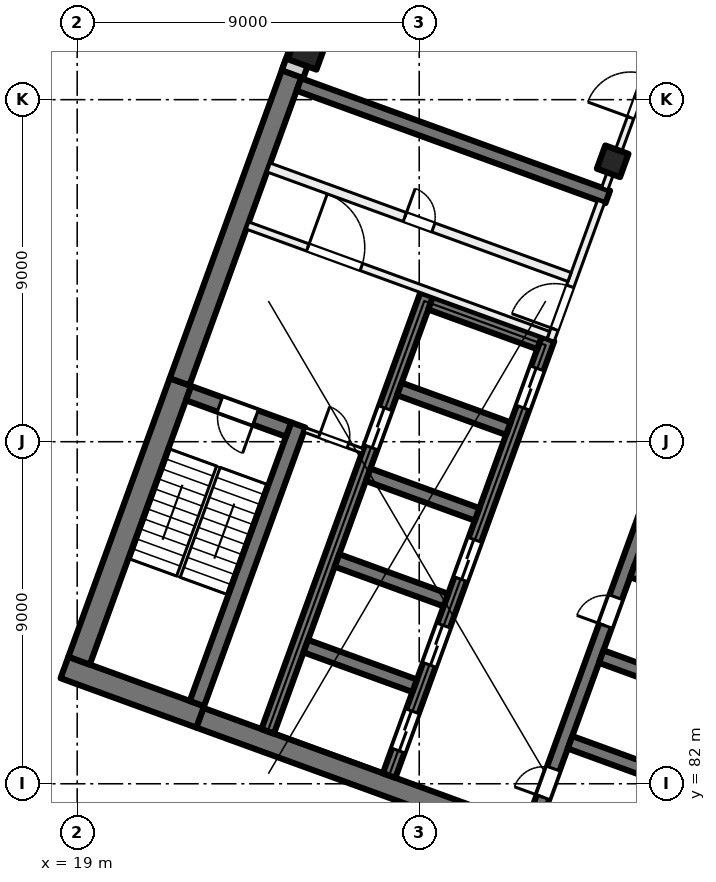
"""IFC4 building model, lengths in metres.
Left out: names, types, materials, properties, quantities, classifications, styles, units other than length and angle.
Written with IfcOpenShell. Run it as: python <this file> out.ifc"""

import sys

from ifc_helpers import new_model, si_unit, direction, frame, frame_2d, origin, origin_2d, place, context, subcontext, project, spatial, rectangle, extrude, element, fill, save


model = new_model("IFC4")
c1 = context("Model", 3, precision=1e-05, world=origin(), true_north=direction((0.0, 1.0)))
c2 = subcontext(c1, "Body", "Model", "MODEL_VIEW")
j1 = project(units=[si_unit("LENGTHUNIT", "METRE"), si_unit("PLANEANGLEUNIT", "RADIAN")], contexts=[c1])
p1 = place(None, origin())
s1 = spatial("IfcSite", under=j1, at=p1, CompositionType="ELEMENT")
p2 = place(p1, origin())
s2 = spatial("IfcBuilding", under=s1, at=p2, CompositionType="ELEMENT")
p3 = place(p2, frame((0.0, 0.0, 146.5)))
s3 = spatial("IfcBuildingStorey", under=s2, at=p3, CompositionType="ELEMENT", Elevation=146.5)
p4 = place(p3, frame((33.091, 98.379, 0.0), z_axis=(0.0, 0.0, 1.0), x_axis=(-0.342020143326, -0.939692620786, 0.0)))
e1 = element("IfcColumn", 1, at=p4, inside=s3, PredefinedType="COLUMN", context=c2, shape_type="SweptSolid", body=[
    extrude(rectangle(XDim=0.65, YDim=0.65, at=origin_2d()), origin(), (0.0, 0.0, 1.0), 4.0),
])
p5 = place(p3, frame((25.056, 101.303, 0.0), z_axis=(0.0, 0.0, 1.0), x_axis=(-0.342020143326, -0.939692620786, 0.0)))
e2 = element("IfcColumn", 2, at=p5, inside=s3, PredefinedType="COLUMN", context=c2, shape_type="SweptSolid", body=[
    extrude(rectangle(XDim=0.8, YDim=0.8, at=origin_2d()), origin(), (0.0, 0.0, 1.0), 4.0),
])
p6 = place(p3, frame((35.759, 78.811, 0.0), z_axis=(0.0, 0.0, 1.0), x_axis=(-0.939692894512, 0.342019391267, 0.0)))
e3 = element("IfcWall", 3, at=p6, inside=s3, PredefinedType="SHEAR", context=c2, shape_type="SweptSolid", body=[
    extrude(rectangle(XDim=14.4, YDim=0.55, at=frame_2d((7.2, 0.0))), origin(), (0.0, 0.0, 1.0), 4.0),
])
p7 = place(p3, frame((22.236, 83.76, 0.0), z_axis=(0.0, 0.0, 1.0), x_axis=(-0.939680822529, 0.342052557032, 0.0)))
e4 = element("IfcWall", 4, at=p7, inside=s3, PredefinedType="SHEAR", context=c2, shape_type="SweptSolid", body=[
    extrude(rectangle(XDim=3.8, YDim=0.6, at=frame_2d((1.9, 0.0))), origin(), (0.0, 0.0, 1.0), 4.0),
])
p8 = place(p3, frame((19.05, 85.239, 0.0), z_axis=(0.0, 0.0, 1.0), x_axis=(0.342016982193, 0.939693771338, 0.0)))
e5 = element("IfcWall", 5, at=p8, inside=s3, PredefinedType="SHEAR", context=c2, shape_type="SweptSolid", body=[
    extrude(rectangle(XDim=7.8, YDim=0.6, at=frame_2d((3.9, 0.0))), origin(), (0.0, 0.0, 1.0), 4.0),
])
p9 = place(p3, frame((21.694, 92.577, 0.0), z_axis=(0.0, 0.0, 1.0), x_axis=(0.342010253184, 0.939696220444, 0.0)))
e6 = element("IfcWall", 6, at=p9, inside=s3, PredefinedType="SHEAR", context=c2, shape_type="SweptSolid", body=[
    extrude(rectangle(XDim=8.95, YDim=0.55, at=frame_2d((4.475, 0.0))), origin(), (0.0, 0.0, 1.0), 4.0),
])
p10 = place(p3, frame((22.15, 84.11, 0.0), z_axis=(0.0, 0.0, 1.0), x_axis=(0.342016982193, 0.939693771338, 0.0)))
e7 = element("IfcWall", 7, at=p10, inside=s3, PredefinedType="SHEAR", context=c2, shape_type="SweptSolid", body=[
    extrude(rectangle(XDim=7.8, YDim=0.4, at=frame_2d((3.9, 0.0))), origin(), (0.0, 0.0, 1.0), 4.0),
])
p11 = place(p3, frame((24.562, 91.32, 0.0), z_axis=(0.0, 0.0, 1.0), x_axis=(-0.939717030584, 0.341953070509, 0.0)))
e8 = element("IfcWall", 8, at=p11, inside=s3, PredefinedType="SHEAR", context=c2, shape_type="SweptSolid", body=[
    extrude(rectangle(XDim=2.8, YDim=0.4, at=frame_2d((1.4, 0.0))), origin(), (0.0, 0.0, 1.0), 4.0),
])
p12 = place(p11, frame((0.925, 0.0, 0.0)))
e9 = element("IfcOpeningElement", 9, at=p12, cuts=e8, PredefinedType="OPENING", context=c2, shape_type="SweptSolid", body=[
    extrude(rectangle(XDim=1.0, YDim=2.1, at=frame_2d((0.5, 1.05))), frame((0.0, 0.21, 0.0), z_axis=(0.0, -1.0, 0.0), x_axis=(1.0, 0.0, 0.0)), (0.0, 0.0, 1.0), 0.42),
])
p13 = place(p3, frame((30.967, 80.848, 0.0), z_axis=(0.0, 0.0, 1.0), x_axis=(0.34201563943, 0.939694260058, 0.0)))
e10 = element("IfcWall", 10, at=p13, inside=s3, PredefinedType="SHEAR", context=c2, shape_type="SweptSolid", body=[
    extrude(rectangle(XDim=12.225, YDim=0.35, at=frame_2d((6.113, 0.0))), origin(), (0.0, 0.0, 1.0), 4.0),
])
p14 = place(p13, frame((0.85, 0.0, 0.0)))
e11 = element("IfcOpeningElement", 11, at=p14, cuts=e10, PredefinedType="OPENING", context=c2, shape_type="SweptSolid", body=[
    extrude(rectangle(XDim=0.8, YDim=2.1, at=frame_2d((0.4, 1.05))), frame((0.0, 0.185, 0.0), z_axis=(0.0, -1.0, 0.0), x_axis=(1.0, 0.0, 0.0)), (0.0, 0.0, 1.0), 0.37),
])
p15 = place(p13, frame((5.65, 0.0, 0.0)))
e12 = element("IfcOpeningElement", 12, at=p15, cuts=e10, PredefinedType="OPENING", context=c2, shape_type="SweptSolid", body=[
    extrude(rectangle(XDim=0.8, YDim=2.1, at=frame_2d((0.4, 1.05))), frame((0.0, 0.185, 0.0), z_axis=(0.0, -1.0, 0.0), x_axis=(1.0, 0.0, 0.0)), (0.0, 0.0, 1.0), 0.37),
])
p16 = place(p3, frame((34.835, 82.047, 0.0), z_axis=(0.0, 0.0, 1.0), x_axis=(-0.939683528043, 0.3420451244, 0.0)))
e13 = element("IfcWall", 13, at=p16, inside=s3, PredefinedType="SHEAR", context=c2, shape_type="SweptSolid", body=[
    extrude(rectangle(XDim=3.05, YDim=0.35, at=frame_2d((1.525, 0.0))), origin(), (0.0, 0.0, 1.0), 4.0),
])
p17 = place(p3, frame((35.656, 84.303, 0.0), z_axis=(0.0, 0.0, 1.0), x_axis=(-0.939709254651, 0.341974438698, 0.0)))
e14 = element("IfcWall", 14, at=p17, inside=s3, PredefinedType="SHEAR", context=c2, shape_type="SweptSolid", body=[
    extrude(rectangle(XDim=3.05, YDim=0.35, at=frame_2d((1.525, 0.0))), origin(), (0.0, 0.0, 1.0), 4.0),
])
p18 = place(p3, frame((36.477, 86.558, 0.0), z_axis=(0.0, 0.0, 1.0), x_axis=(-0.939683528043, 0.3420451244, 0.0)))
e15 = element("IfcWall", 15, at=p18, inside=s3, PredefinedType="SHEAR", context=c2, shape_type="SweptSolid", body=[
    extrude(rectangle(XDim=3.05, YDim=0.35, at=frame_2d((1.525, 0.0))), origin(), (0.0, 0.0, 1.0), 4.0),
])
p19 = place(p3, frame((27.208, 82.216, 0.0), z_axis=(0.0, 0.0, 1.0), x_axis=(0.34201563943, 0.939694260058, 0.0)))
e16 = element("IfcWall", 16, at=p19, inside=s3, PredefinedType="SHEAR", context=c2, shape_type="SweptSolid", body=[
    extrude(rectangle(XDim=12.225, YDim=0.35, at=frame_2d((6.113, 0.0))), origin(), (0.0, 0.0, 1.0), 4.0),
])
p20 = place(p19, frame((0.7, 0.0, 0.0)))
e17 = element("IfcOpeningElement", 17, at=p20, cuts=e16, PredefinedType="OPENING", context=c2, shape_type="SweptSolid", body=[
    extrude(rectangle(XDim=1.1, YDim=2.1, at=frame_2d((0.55, 1.05))), frame((0.0, 0.185, 0.0), z_axis=(0.0, -1.0, 0.0), x_axis=(1.0, 0.0, 0.0)), (0.0, 0.0, 1.0), 0.37),
])
p21 = place(p19, frame((3.1, 0.0, 0.0)))
e18 = element("IfcOpeningElement", 18, at=p21, cuts=e16, PredefinedType="OPENING", context=c2, shape_type="SweptSolid", body=[
    extrude(rectangle(XDim=1.1, YDim=2.1, at=frame_2d((0.55, 1.05))), frame((0.0, 0.185, 0.0), z_axis=(0.0, -1.0, 0.0), x_axis=(1.0, 0.0, 0.0)), (0.0, 0.0, 1.0), 0.37),
])
p22 = place(p19, frame((5.5, 0.0, 0.0)))
e19 = element("IfcOpeningElement", 19, at=p22, cuts=e16, PredefinedType="OPENING", context=c2, shape_type="SweptSolid", body=[
    extrude(rectangle(XDim=1.1, YDim=2.1, at=frame_2d((0.55, 1.05))), frame((0.0, 0.185, 0.0), z_axis=(0.0, -1.0, 0.0), x_axis=(1.0, 0.0, 0.0)), (0.0, 0.0, 1.0), 0.37),
])
p23 = place(p19, frame((10.3, 0.0, 0.0)))
e20 = element("IfcOpeningElement", 20, at=p23, cuts=e16, PredefinedType="OPENING", context=c2, shape_type="SweptSolid", body=[
    extrude(rectangle(XDim=1.1, YDim=2.1, at=frame_2d((0.55, 1.05))), frame((0.0, 0.185, 0.0), z_axis=(0.0, -1.0, 0.0), x_axis=(1.0, 0.0, 0.0)), (0.0, 0.0, 1.0), 0.37),
])
p24 = place(p3, frame((24.013, 83.379, 0.0), z_axis=(0.0, 0.0, 1.0), x_axis=(0.34201563943, 0.939694260058, 0.0)))
e21 = element("IfcWall", 21, at=p24, inside=s3, PredefinedType="SHEAR", context=c2, shape_type="SweptSolid", body=[
    extrude(rectangle(XDim=12.225, YDim=0.35, at=frame_2d((6.113, 0.0))), origin(), (0.0, 0.0, 1.0), 4.0),
])
p25 = place(p24, frame((7.95, 0.0, 0.0)))
e22 = element("IfcOpeningElement", 22, at=p25, cuts=e21, PredefinedType="OPENING", context=c2, shape_type="SweptSolid", body=[
    extrude(rectangle(XDim=1.1, YDim=2.1, at=frame_2d((0.55, 1.05))), frame((0.0, 0.185, 0.0), z_axis=(0.0, -1.0, 0.0), x_axis=(1.0, 0.0, 0.0)), (0.0, 0.0, 1.0), 0.37),
])
for number, where, z_axis, x_axis in (
    (23, (27.881, 84.578, 0.0), (0.0, 0.0, 1.0), (-0.94, 0.342, 0.0)),
    (24, (28.702, 86.833, 0.0), (0.0, 0.0, 1.0), (-0.94, 0.342, 0.0)),
    (25, (29.523, 89.089, 0.0), (0.0, 0.0, 1.0), (-0.94, 0.342, 0.0)),
):
    element("IfcWall", number, at=place(p3, frame(where, z_axis=z_axis, x_axis=x_axis)), inside=s3, PredefinedType="SHEAR", context=c2, shape_type="SweptSolid", body=[
        extrude(rectangle(XDim=3.05, YDim=0.35, at=frame_2d((1.525, 0.0))), origin(), (0.0, 0.0, 1.0), 4.0),
    ])
p26 = place(p3, frame((30.344, 91.344, 0.0), z_axis=(0.0, 0.0, 1.0), x_axis=(-0.939709254651, 0.341974438698, 0.0)))
e26 = element("IfcWall", 26, at=p26, inside=s3, PredefinedType="SHEAR", context=c2, shape_type="SweptSolid", body=[
    extrude(rectangle(XDim=3.05, YDim=0.35, at=frame_2d((1.525, 0.0))), origin(), (0.0, 0.0, 1.0), 4.0),
])
p27 = place(p3, frame((31.165, 93.599, 0.0), z_axis=(0.0, 0.0, 1.0), x_axis=(-0.939683528043, 0.3420451244, 0.0)))
e27 = element("IfcWall", 27, at=p27, inside=s3, PredefinedType="SHEAR", context=c2, shape_type="SweptSolid", body=[
    extrude(rectangle(XDim=3.05, YDim=0.35, at=frame_2d((1.525, 0.0))), origin(), (0.0, 0.0, 1.0), 4.0),
])
p28 = place(p3, frame((32.962, 97.441, 0.0), z_axis=(0.0, 0.0, 1.0), x_axis=(-0.939689545667, 0.342028592028, 0.0)))
e28 = element("IfcWall", 28, at=p28, inside=s3, PredefinedType="SHEAR", context=c2, shape_type="SweptSolid", body=[
    extrude(rectangle(XDim=8.65, YDim=0.35, at=frame_2d((4.325, 0.0))), origin(), (0.0, 0.0, 1.0), 4.0),
])
p29 = place(p3, frame((24.666, 100.669, 0.0), z_axis=(0.0, 0.0, 1.0), x_axis=(0.34201964167, 0.939692803373, 0.0)))
e29 = element("IfcWall", 29, at=p29, inside=s3, PredefinedType="SOLIDWALL", context=c2, shape_type="SweptSolid", body=[
    extrude(rectangle(XDim=32.884, YDim=0.6, at=frame_2d((16.442, 0.0))), origin(), (0.0, 0.0, 1.0), 3.625),
])
p30 = place(p29, frame((1.48, 0.0, 0.9)))
e30 = element("IfcOpeningElement", 30, at=p30, cuts=e29, PredefinedType="OPENING", context=c2, shape_type="SweptSolid", body=[
    extrude(rectangle(XDim=3.0, YDim=2.4, at=frame_2d((1.5, 1.2))), frame((0.0, 0.31, 0.0), z_axis=(0.0, -1.0, 0.0), x_axis=(1.0, 0.0, 0.0)), (0.0, 0.0, 1.0), 0.62),
])
p31 = place(p29, frame((5.98, 0.0, 0.9)))
e31 = element("IfcOpeningElement", 31, at=p31, cuts=e29, PredefinedType="OPENING", context=c2, shape_type="SweptSolid", body=[
    extrude(rectangle(XDim=3.0, YDim=2.4, at=frame_2d((1.5, 1.2))), frame((0.0, 0.31, 0.0), z_axis=(0.0, -1.0, 0.0), x_axis=(1.0, 0.0, 0.0)), (0.0, 0.0, 1.0), 0.62),
])
p32 = place(p29, frame((10.48, 0.0, 0.9)))
e32 = element("IfcOpeningElement", 32, at=p32, cuts=e29, PredefinedType="OPENING", context=c2, shape_type="SweptSolid", body=[
    extrude(rectangle(XDim=3.0, YDim=2.4, at=frame_2d((1.5, 1.2))), frame((0.0, 0.31, 0.0), z_axis=(0.0, -1.0, 0.0), x_axis=(1.0, 0.0, 0.0)), (0.0, 0.0, 1.0), 0.62),
])
p33 = place(p29, frame((14.98, 0.0, 0.9)))
e33 = element("IfcOpeningElement", 33, at=p33, cuts=e29, PredefinedType="OPENING", context=c2, shape_type="SweptSolid", body=[
    extrude(rectangle(XDim=3.0, YDim=2.4, at=frame_2d((1.5, 1.2))), frame((0.0, 0.31, 0.0), z_axis=(0.0, -1.0, 0.0), x_axis=(1.0, 0.0, 0.0)), (0.0, 0.0, 1.0), 0.62),
])
p34 = place(p29, frame((19.48, 0.0, 0.9)))
e34 = element("IfcOpeningElement", 34, at=p34, cuts=e29, PredefinedType="OPENING", context=c2, shape_type="SweptSolid", body=[
    extrude(rectangle(XDim=3.0, YDim=2.4, at=frame_2d((1.5, 1.2))), frame((0.0, 0.31, 0.0), z_axis=(0.0, -1.0, 0.0), x_axis=(1.0, 0.0, 0.0)), (0.0, 0.0, 1.0), 0.62),
])
p35 = place(p29, frame((23.98, 0.0, 0.9)))
e35 = element("IfcOpeningElement", 35, at=p35, cuts=e29, PredefinedType="OPENING", context=c2, shape_type="SweptSolid", body=[
    extrude(rectangle(XDim=3.0, YDim=2.4, at=frame_2d((1.5, 1.2))), frame((0.0, 0.31, 0.0), z_axis=(0.0, -1.0, 0.0), x_axis=(1.0, 0.0, 0.0)), (0.0, 0.0, 1.0), 0.62),
])
p36 = place(p29, frame((28.48, 0.0, 0.9)))
e36 = element("IfcOpeningElement", 36, at=p36, cuts=e29, PredefinedType="OPENING", context=c2, shape_type="SweptSolid", body=[
    extrude(rectangle(XDim=3.0, YDim=2.4, at=frame_2d((1.5, 1.2))), frame((0.0, 0.31, 0.0), z_axis=(0.0, -1.0, 0.0), x_axis=(1.0, 0.0, 0.0)), (0.0, 0.0, 1.0), 0.62),
])
p37 = place(p3, frame((31.459, 93.678, 0.0), z_axis=(0.0, 0.0, 1.0), x_axis=(0.341985870128, 0.939705094502, 0.0)))
e37 = element("IfcWall", 37, at=p37, inside=s3, PredefinedType="PARTITIONING", context=c2, shape_type="SweptSolid", body=[
    extrude(rectangle(XDim=3.875, YDim=0.2, at=frame_2d((1.938, 0.0))), origin(), (0.0, 0.0, 1.0), 3.625),
])
p38 = place(p37, frame((0.3, 0.0, 0.0)))
e38 = element("IfcOpeningElement", 38, at=p38, cuts=e37, PredefinedType="OPENING", context=c2, shape_type="SweptSolid", body=[
    extrude(rectangle(XDim=1.2, YDim=2.1, at=frame_2d((0.6, 1.05))), frame((0.0, 0.11, 0.0), z_axis=(0.0, -1.0, 0.0), x_axis=(1.0, 0.0, 0.0)), (0.0, 0.0, 1.0), 0.22),
])
p39 = place(p3, frame((23.483, 96.688, 0.0), z_axis=(0.0, 0.0, 1.0), x_axis=(0.939691007314, -0.342024576271, 0.0)))
e39 = element("IfcWall", 39, at=p39, inside=s3, PredefinedType="PARTITIONING", context=c2, shape_type="SweptSolid", body=[
    extrude(rectangle(XDim=8.425, YDim=0.2, at=frame_2d((4.212, 0.0))), origin(), (0.0, 0.0, 1.0), 3.625),
])
p40 = place(p39, frame((1.688, 0.0, 0.0)))
e40 = element("IfcOpeningElement", 40, at=p40, cuts=e39, PredefinedType="OPENING", context=c2, shape_type="SweptSolid", body=[
    extrude(rectangle(XDim=1.5, YDim=2.1, at=frame_2d((0.75, 1.05))), frame((0.0, 0.11, 0.0), z_axis=(0.0, -1.0, 0.0), x_axis=(1.0, 0.0, 0.0)), (0.0, 0.0, 1.0), 0.22),
])
p41 = place(p3, frame((24.039, 98.215, 0.0), z_axis=(0.0, 0.0, 1.0), x_axis=(0.939687617333, -0.342033889887, 0.0)))
e41 = element("IfcWall", 41, at=p41, inside=s3, PredefinedType="PARTITIONING", context=c2, shape_type="SweptSolid", body=[
    extrude(rectangle(XDim=8.425, YDim=0.25, at=frame_2d((4.212, 0.0))), origin(), (0.0, 0.0, 1.0), 3.625),
])
p42 = place(p41, frame((3.812, 0.0, 0.0)))
e42 = element("IfcOpeningElement", 42, at=p42, cuts=e41, PredefinedType="OPENING", context=c2, shape_type="SweptSolid", body=[
    extrude(rectangle(XDim=0.8, YDim=2.1, at=frame_2d((0.4, 1.05))), frame((0.0, 0.135, 0.0), z_axis=(0.0, -1.0, 0.0), x_axis=(1.0, 0.0, 0.0)), (0.0, 0.0, 1.0), 0.27),
])
p43 = place(p3, frame((24.985, 91.312, 0.0), z_axis=(0.0, 0.0, 1.0), x_axis=(0.939705651352, -0.341984340019, 0.0)))
e43 = element("IfcWall", 43, at=p43, inside=s3, PredefinedType="PARTITIONING", context=c2, shape_type="SweptSolid", body=[
    extrude(rectangle(XDim=1.625, YDim=0.125, at=frame_2d((0.812, 0.0))), origin(), (0.0, 0.0, 1.0), 3.625),
])
p44 = place(p43, frame((0.413, 0.0, 0.0)))
e44 = element("IfcOpeningElement", 44, at=p44, cuts=e43, PredefinedType="OPENING", context=c2, shape_type="SweptSolid", body=[
    extrude(rectangle(XDim=0.8, YDim=2.1, at=frame_2d((0.4, 1.05))), frame((0.0, 0.073, 0.0), z_axis=(0.0, -1.0, 0.0), x_axis=(1.0, 0.0, 0.0)), (0.0, 0.0, 1.0), 0.145),
])
p45 = place(p3, frame((32.881, 97.657, 0.0), z_axis=(0.0, 0.0, 1.0), x_axis=(0.342058204353, 0.939678766832, 0.0)))
e45 = element("IfcWall", 45, at=p45, inside=s3, PredefinedType="PARTITIONING", context=c2, shape_type="SweptSolid", body=[
    extrude(rectangle(XDim=5.163, YDim=0.175, at=frame_2d((2.581, 0.0))), origin(), (0.0, 0.0, 1.0), 3.625),
])
p46 = place(p45, frame((1.991, 0.0, 0.0)))
e46 = element("IfcOpeningElement", 46, at=p46, cuts=e45, PredefinedType="OPENING", context=c2, shape_type="SweptSolid", body=[
    extrude(rectangle(XDim=1.2, YDim=2.1, at=frame_2d((0.6, 1.05))), frame((0.0, 0.097, 0.0), z_axis=(0.0, -1.0, 0.0), x_axis=(1.0, 0.0, 0.0)), (0.0, 0.0, 1.0), 0.195),
])
p47 = place(p20, origin())
e47 = element("IfcDoor", 47, at=p47, inside=s3, OperationType="DOUBLE_DOOR_SLIDING", PredefinedType="DOOR", context=c2, shape_type="SweptSolid", body=[
    extrude(rectangle(XDim=1.1, YDim=2.1, at=frame_2d((0.55, 1.05))), frame((0.0, 0.025, 0.0), z_axis=(0.0, -1.0, 0.0), x_axis=(1.0, 0.0, 0.0)), (0.0, 0.0, 1.0), 0.05),
])
fill(e17, e47)
p48 = place(p21, origin())
e48 = element("IfcDoor", 48, at=p48, inside=s3, OperationType="DOUBLE_DOOR_SLIDING", PredefinedType="DOOR", context=c2, shape_type="SweptSolid", body=[
    extrude(rectangle(XDim=1.1, YDim=2.1, at=frame_2d((0.55, 1.05))), frame((0.0, 0.025, 0.0), z_axis=(0.0, -1.0, 0.0), x_axis=(1.0, 0.0, 0.0)), (0.0, 0.0, 1.0), 0.05),
])
fill(e18, e48)
p49 = place(p22, origin())
e49 = element("IfcDoor", 49, at=p49, inside=s3, OperationType="DOUBLE_DOOR_SLIDING", PredefinedType="DOOR", context=c2, shape_type="SweptSolid", body=[
    extrude(rectangle(XDim=1.1, YDim=2.1, at=frame_2d((0.55, 1.05))), frame((0.0, 0.025, 0.0), z_axis=(0.0, -1.0, 0.0), x_axis=(1.0, 0.0, 0.0)), (0.0, 0.0, 1.0), 0.05),
])
fill(e19, e49)
p50 = place(p23, origin())
e50 = element("IfcDoor", 50, at=p50, inside=s3, OperationType="DOUBLE_DOOR_SLIDING", PredefinedType="DOOR", context=c2, shape_type="SweptSolid", body=[
    extrude(rectangle(XDim=1.1, YDim=2.1, at=frame_2d((0.55, 1.05))), frame((0.0, 0.025, 0.0), z_axis=(0.0, -1.0, 0.0), x_axis=(1.0, 0.0, 0.0)), (0.0, 0.0, 1.0), 0.05),
])
fill(e20, e50)
p51 = place(p14, origin())
e51 = element("IfcDoor", 51, at=p51, inside=s3, OperationType="SINGLE_SWING_LEFT", PredefinedType="DOOR", context=c2, shape_type="SweptSolid", body=[
    extrude(rectangle(XDim=0.8, YDim=2.1, at=frame_2d((0.4, 1.05))), frame((0.0, 0.025, 0.0), z_axis=(0.0, -1.0, 0.0), x_axis=(1.0, 0.0, 0.0)), (0.0, 0.0, 1.0), 0.05),
])
fill(e11, e51)
p52 = place(p15, origin())
e52 = element("IfcDoor", 52, at=p52, inside=s3, OperationType="SINGLE_SWING_RIGHT", PredefinedType="DOOR", context=c2, shape_type="SweptSolid", body=[
    extrude(rectangle(XDim=0.8, YDim=2.1, at=frame_2d((0.4, 1.05))), frame((0.0, 0.025, 0.0), z_axis=(0.0, -1.0, 0.0), x_axis=(1.0, 0.0, 0.0)), (0.0, 0.0, 1.0), 0.05),
])
fill(e12, e52)
p53 = place(p38, origin())
e53 = element("IfcDoor", 53, at=p53, inside=s3, OperationType="DOUBLE_DOOR_SINGLE_SWING", PredefinedType="DOOR", context=c2, shape_type="SweptSolid", body=[
    extrude(rectangle(XDim=1.2, YDim=2.1, at=frame_2d((0.6, 1.05))), frame((0.0, 0.025, 0.0), z_axis=(0.0, -1.0, 0.0), x_axis=(1.0, 0.0, 0.0)), (0.0, 0.0, 1.0), 0.05),
])
fill(e38, e53)
p54 = place(p40, origin())
e54 = element("IfcDoor", 54, at=p54, inside=s3, OperationType="DOUBLE_DOOR_SINGLE_SWING", PredefinedType="DOOR", context=c2, shape_type="SweptSolid", body=[
    extrude(rectangle(XDim=1.5, YDim=2.1, at=frame_2d((0.75, 1.05))), frame((0.0, 0.025, 0.0), z_axis=(0.0, -1.0, 0.0), x_axis=(1.0, 0.0, 0.0)), (0.0, 0.0, 1.0), 0.05),
])
fill(e40, e54)
p55 = place(p12, origin())
e55 = element("IfcDoor", 55, at=p55, inside=s3, OperationType="SINGLE_SWING_LEFT", PredefinedType="DOOR", context=c2, shape_type="SweptSolid", body=[
    extrude(rectangle(XDim=1.0, YDim=2.1, at=frame_2d((0.5, 1.05))), frame((0.0, 0.025, 0.0), z_axis=(0.0, -1.0, 0.0), x_axis=(1.0, 0.0, 0.0)), (0.0, 0.0, 1.0), 0.05),
])
fill(e9, e55)
p56 = place(p44, origin())
e56 = element("IfcDoor", 56, at=p56, inside=s3, OperationType="SINGLE_SWING_RIGHT", PredefinedType="DOOR", context=c2, shape_type="SweptSolid", body=[
    extrude(rectangle(XDim=0.8, YDim=2.1, at=frame_2d((0.4, 1.05))), frame((0.0, 0.025, 0.0), z_axis=(0.0, -1.0, 0.0), x_axis=(1.0, 0.0, 0.0)), (0.0, 0.0, 1.0), 0.05),
])
fill(e44, e56)
p57 = place(p42, origin())
e57 = element("IfcDoor", 57, at=p57, inside=s3, OperationType="SINGLE_SWING_LEFT", PredefinedType="DOOR", context=c2, shape_type="SweptSolid", body=[
    extrude(rectangle(XDim=0.8, YDim=2.1, at=frame_2d((0.4, 1.05))), frame((0.0, 0.025, 0.0), z_axis=(0.0, -1.0, 0.0), x_axis=(1.0, 0.0, 0.0)), (0.0, 0.0, 1.0), 0.05),
])
fill(e42, e57)
p58 = place(p25, origin())
e58 = element("IfcDoor", 58, at=p58, inside=s3, OperationType="DOUBLE_DOOR_SLIDING", PredefinedType="DOOR", context=c2, shape_type="SweptSolid", body=[
    extrude(rectangle(XDim=1.1, YDim=2.1, at=frame_2d((0.55, 1.05))), frame((0.0, 0.025, 0.0), z_axis=(0.0, -1.0, 0.0), x_axis=(1.0, 0.0, 0.0)), (0.0, 0.0, 1.0), 0.05),
])
fill(e22, e58)
p59 = place(p46, origin())
e59 = element("IfcDoor", 59, at=p59, inside=s3, OperationType="DOUBLE_DOOR_SINGLE_SWING", PredefinedType="DOOR", context=c2, shape_type="SweptSolid", body=[
    extrude(rectangle(XDim=1.2, YDim=2.1, at=frame_2d((0.6, 1.05))), frame((0.0, 0.025, 0.0), z_axis=(0.0, -1.0, 0.0), x_axis=(1.0, 0.0, 0.0)), (0.0, 0.0, 1.0), 0.05),
])
fill(e46, e59)
save(model, sys.argv[1])
